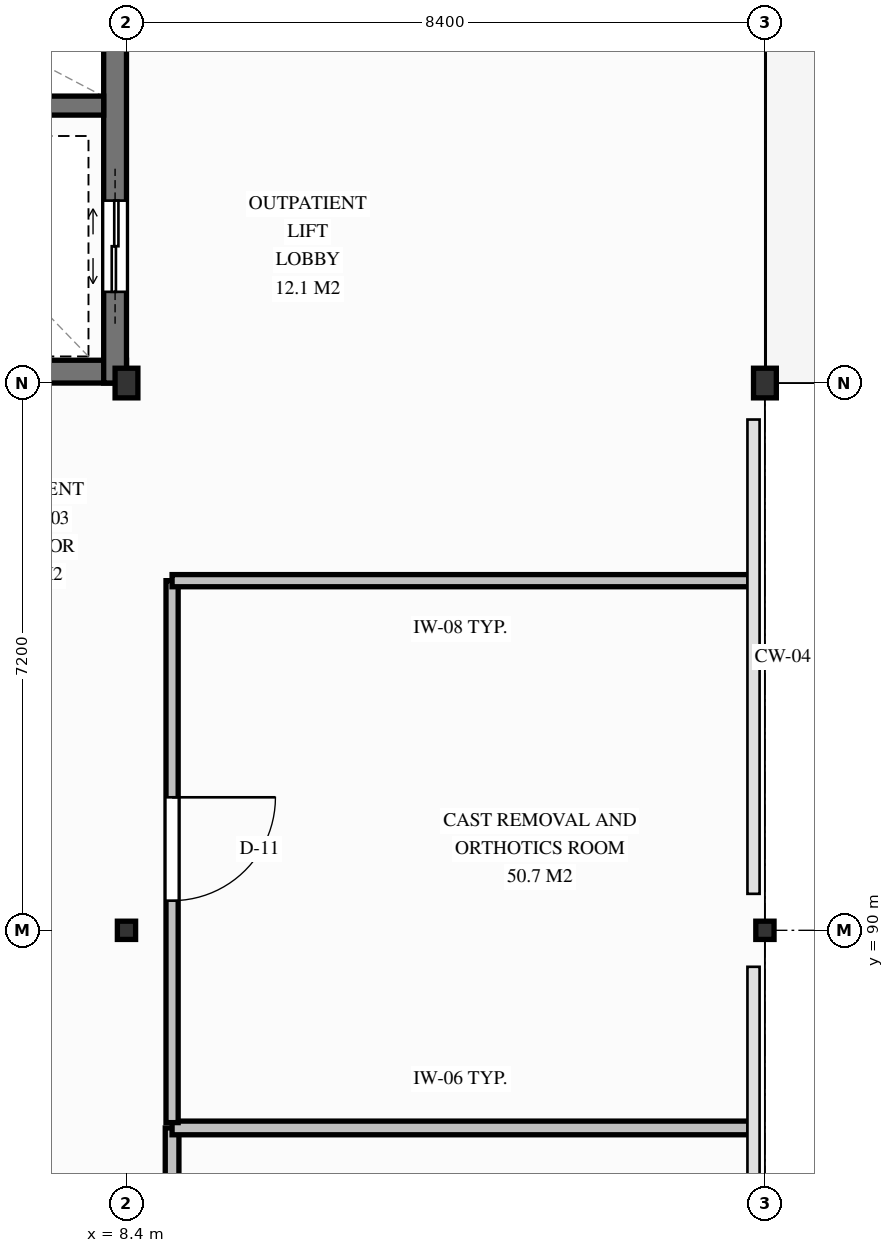
"""IFC4 building model, lengths in metres.
Left out: names, types, materials, properties, quantities, classifications, styles, units other than length and angle.
Written with IfcOpenShell. Run it as: python <this file> out.ifc"""

import sys

from ifc_helpers import new_model, si_unit, direction, frame, frame_2d, origin, origin_2d, place, context, subcontext, project, spatial, rectangle, i_section, extrude, element, fill, save


model = new_model("IFC4")
c1 = context("Model", 3, precision=1e-05, world=origin(), true_north=direction((0.0, 1.0)))
c2 = subcontext(c1, "Body", "Model", "MODEL_VIEW")
j1 = project(units=[si_unit("LENGTHUNIT", "METRE"), si_unit("PLANEANGLEUNIT", "RADIAN")], contexts=[c1])
p1 = place(None, origin())
s1 = spatial("IfcSite", under=j1, at=p1, CompositionType="ELEMENT")
p2 = place(p1, origin())
s2 = spatial("IfcBuilding", under=s1, at=p2, CompositionType="ELEMENT")
p3 = place(p2, frame((0.0, 0.0, 13.2)))
s3 = spatial("IfcBuildingStorey", under=s2, at=p3, CompositionType="ELEMENT", Elevation=13.2)
p4 = place(p3, frame((0.0, 97.35, 0.0), z_axis=(0.0, 0.0, 1.0), x_axis=(1.0, 0.0, 0.0)))
e1 = element("IfcWall", 1, at=p4, inside=s3, PredefinedType="SHEAR", context=c2, shape_type="SweptSolid", body=[
    extrude(rectangle(XDim=8.4, YDim=0.3, at=frame_2d((4.2, 0.0))), origin(), (0.0, 0.0, 1.0), 4.05),
])
p5 = place(p4, frame((3.0, 0.0, 0.0)))
e2 = element("IfcOpeningElement", 2, at=p5, cuts=e1, PredefinedType="OPENING", context=c2, shape_type="SweptSolid", body=[
    extrude(rectangle(XDim=1.1, YDim=2.15, at=frame_2d((0.55, 1.075))), frame((0.0, 0.16, 0.0), z_axis=(0.0, -1.0, 0.0), x_axis=(1.0, 0.0, 0.0)), (0.0, 0.0, 1.0), 0.32),
])
p6 = place(p3, frame((8.25, 97.2, 0.0), z_axis=(0.0, 0.0, 1.0), x_axis=(0.0, 1.0, 0.0)))
e3 = element("IfcWall", 3, at=p6, inside=s3, PredefinedType="SHEAR", context=c2, shape_type="SweptSolid", body=[
    extrude(rectangle(XDim=7.2, YDim=0.3, at=frame_2d((3.6, 0.0))), origin(), (0.0, 0.0, 1.0), 4.05),
])
p7 = place(p6, frame((1.2, 0.0, 0.0)))
e4 = element("IfcOpeningElement", 4, at=p7, cuts=e3, PredefinedType="OPENING", context=c2, shape_type="SweptSolid", body=[
    extrude(rectangle(XDim=1.2, YDim=2.15, at=frame_2d((0.6, 1.075))), frame((0.0, 0.16, 0.0), z_axis=(0.0, -1.0, 0.0), x_axis=(1.0, 0.0, 0.0)), (0.0, 0.0, 1.0), 0.32),
])
p8 = place(p3, frame((0.3, 100.85, 0.0), z_axis=(0.0, 0.0, 1.0), x_axis=(1.0, 0.0, 0.0)))
e5 = element("IfcWall", 5, at=p8, inside=s3, PredefinedType="SHEAR", context=c2, shape_type="SweptSolid", body=[
    extrude(rectangle(XDim=7.8, YDim=0.25, at=frame_2d((3.9, 0.0))), origin(), (0.0, 0.0, 1.0), 4.05),
])
p9 = place(p8, frame((0.4, 0.0, 0.0)))
e6 = element("IfcOpeningElement", 6, at=p9, cuts=e5, PredefinedType="OPENING", context=c2, shape_type="SweptSolid", body=[
    extrude(rectangle(XDim=1.1, YDim=2.15, at=frame_2d((0.55, 1.075))), frame((0.0, 0.135, 0.0), z_axis=(0.0, -1.0, 0.0), x_axis=(1.0, 0.0, 0.0)), (0.0, 0.0, 1.0), 0.27),
])
p10 = place(p3, frame((8.4, 90.0, 0.0), z_axis=(0.0, 0.0, 1.0), x_axis=(1.0, 0.0, 0.0)))
e7 = element("IfcColumn", 7, at=p10, inside=s3, PredefinedType="COLUMN", context=c2, shape_type="SweptSolid", body=[
    extrude(i_section(OverallWidth=0.24, OverallDepth=0.24, WebThickness=0.01, FlangeThickness=0.017, FilletRadius=0.021, at=origin_2d()), origin(), (0.0, 0.0, 1.0), 4.05),
])
p11 = place(p3, frame((8.4, 97.2, 0.0), z_axis=(0.0, 0.0, 1.0), x_axis=(1.0, 0.0, 0.0)))
e8 = element("IfcColumn", 8, at=p11, inside=s3, PredefinedType="COLUMN", context=c2, shape_type="SweptSolid", body=[
    extrude(i_section(OverallWidth=0.3, OverallDepth=0.39, WebThickness=0.011, FlangeThickness=0.019, FilletRadius=0.027, at=origin_2d()), origin(), (0.0, 0.0, 1.0), 4.05),
])
p12 = place(p3, frame((16.8, 90.0, 0.0), z_axis=(0.0, 0.0, 1.0), x_axis=(1.0, 0.0, 0.0)))
e9 = element("IfcColumn", 9, at=p12, inside=s3, PredefinedType="COLUMN", context=c2, shape_type="SweptSolid", body=[
    extrude(i_section(OverallWidth=0.24, OverallDepth=0.24, WebThickness=0.01, FlangeThickness=0.017, FilletRadius=0.021, at=origin_2d()), origin(), (0.0, 0.0, 1.0), 4.05),
])
p13 = place(p3, frame((16.8, 97.2, 0.0), z_axis=(0.0, 0.0, 1.0), x_axis=(1.0, 0.0, 0.0)))
e10 = element("IfcColumn", 10, at=p13, inside=s3, PredefinedType="COLUMN", context=c2, shape_type="SweptSolid", body=[
    extrude(i_section(OverallWidth=0.3, OverallDepth=0.39, WebThickness=0.011, FlangeThickness=0.019, FilletRadius=0.027, at=origin_2d()), origin(), (0.0, 0.0, 1.0), 4.05),
])
p14 = place(p3, frame((9.0, 67.4, 0.0), z_axis=(0.0, 0.0, 1.0), x_axis=(0.0, 1.0, 0.0)))
e11 = element("IfcWall", 11, at=p14, inside=s3, PredefinedType="PARTITIONING", context=c2, shape_type="SweptSolid", body=[
    extrude(rectangle(XDim=20.0, YDim=0.18, at=frame_2d((10.0, 0.0))), origin(), (0.0, 0.0, 1.0), 3.328),
])
p15 = place(p14, frame((9.45, 0.0, 0.0)))
e12 = element("IfcOpeningElement", 12, at=p15, cuts=e11, PredefinedType="OPENING", context=c2, shape_type="SweptSolid", body=[
    extrude(rectangle(XDim=1.48, YDim=2.24, at=frame_2d((0.74, 1.12))), frame((0.0, 0.1, 0.0), z_axis=(0.0, -1.0, 0.0), x_axis=(1.0, 0.0, 0.0)), (0.0, 0.0, 1.0), 0.2),
])
p16 = place(p3, frame((9.0, 87.4, 0.0), z_axis=(0.0, 0.0, 1.0), x_axis=(1.0, 0.0, 0.0)))
e13 = element("IfcWall", 13, at=p16, inside=s3, PredefinedType="PARTITIONING", context=c2, shape_type="SweptSolid", body=[
    extrude(rectangle(XDim=7.59, YDim=0.18, at=frame_2d((3.795, 0.0))), origin(), (0.0, 0.0, 1.0), 3.478),
])
p17 = place(p3, frame((9.0, 94.6, 0.0), z_axis=(0.0, 0.0, 1.0), x_axis=(0.0, -1.0, 0.0)))
e14 = element("IfcWall", 14, at=p17, inside=s3, PredefinedType="PARTITIONING", context=c2, shape_type="SweptSolid", body=[
    extrude(rectangle(XDim=7.13, YDim=0.16, at=frame_2d((3.565, 0.0))), origin(), (0.0, 0.0, 1.0), 3.338),
])
p18 = place(p17, frame((2.85, 0.0, 0.0)))
e15 = element("IfcOpeningElement", 15, at=p18, cuts=e14, PredefinedType="OPENING", context=c2, shape_type="SweptSolid", body=[
    extrude(rectangle(XDim=1.36, YDim=2.2, at=frame_2d((0.68, 1.1))), frame((0.0, 0.09, 0.0), z_axis=(0.0, -1.0, 0.0), x_axis=(1.0, 0.0, 0.0)), (0.0, 0.0, 1.0), 0.18),
])
p19 = place(p3, frame((16.59, 94.6, 0.0), z_axis=(0.0, 0.0, 1.0), x_axis=(-1.0, 0.0, 0.0)))
e16 = element("IfcWall", 16, at=p19, inside=s3, PredefinedType="PARTITIONING", context=c2, shape_type="SweptSolid", body=[
    extrude(rectangle(XDim=7.59, YDim=0.16, at=frame_2d((3.795, 0.0))), origin(), (0.0, 0.0, 1.0), 3.498),
])
p20 = place(p7, origin())
e17 = element("IfcDoor", 17, at=p20, inside=s3, OperationType="DOUBLE_DOOR_SLIDING", PredefinedType="DOOR", context=c2, shape_type="SweptSolid", body=[
    extrude(rectangle(XDim=1.2, YDim=2.15, at=frame_2d((0.6, 1.075))), frame((0.0, 0.025, 0.0), z_axis=(0.0, -1.0, 0.0), x_axis=(1.0, 0.0, 0.0)), (0.0, 0.0, 1.0), 0.05),
])
fill(e4, e17)
p21 = place(p18, origin())
e18 = element("IfcDoor", 18, at=p21, inside=s3, OperationType="SINGLE_SWING_LEFT", PredefinedType="DOOR", context=c2, shape_type="SweptSolid", body=[
    extrude(rectangle(XDim=1.36, YDim=2.2, at=frame_2d((0.68, 1.1))), frame((0.0, 0.025, 0.0), z_axis=(0.0, -1.0, 0.0), x_axis=(1.0, 0.0, 0.0)), (0.0, 0.0, 1.0), 0.05),
])
fill(e15, e18)
save(model, sys.argv[1])
